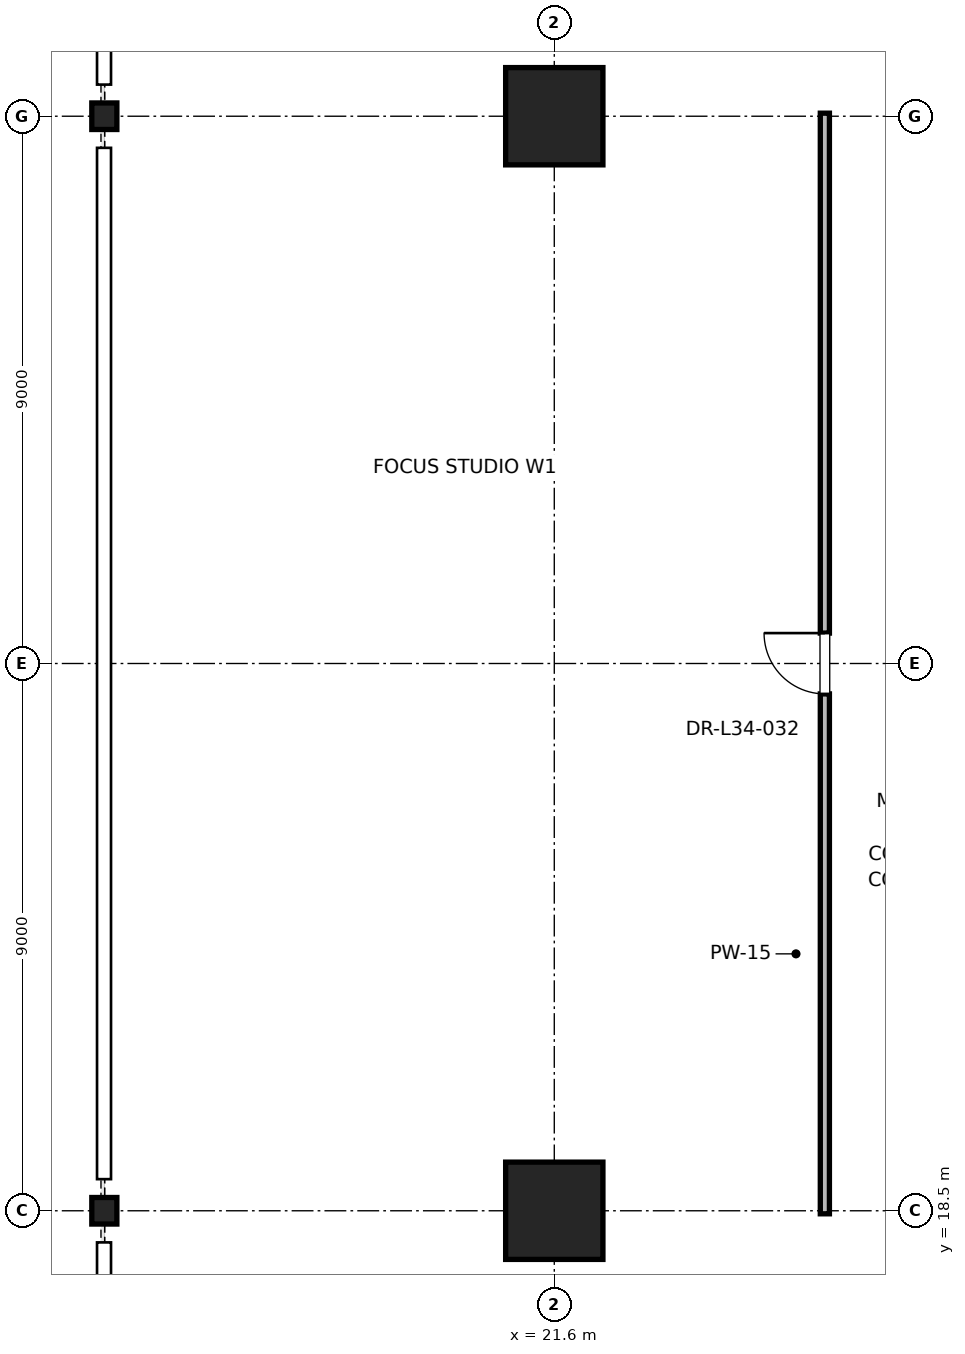
"""IFC4 building model, lengths in metres.
Left out: names, types, materials, properties, quantities, classifications, styles, units other than length and angle.
Written with IfcOpenShell. Run it as: python <this file> out.ifc"""

import sys

from ifc_helpers import new_model, si_unit, direction, frame, frame_2d, origin, origin_2d, place, context, subcontext, project, spatial, rectangle, i_section, extrude, element, fill, save


model = new_model("IFC4")
c1 = context("Model", 3, precision=1e-05, world=origin(), true_north=direction((0.0, 1.0)))
c2 = subcontext(c1, "Body", "Model", "MODEL_VIEW")
j1 = project(units=[si_unit("LENGTHUNIT", "METRE"), si_unit("PLANEANGLEUNIT", "RADIAN")], contexts=[c1])
p1 = place(None, origin())
s1 = spatial("IfcSite", under=j1, at=p1, CompositionType="ELEMENT")
p2 = place(p1, origin())
s2 = spatial("IfcBuilding", under=s1, at=p2, CompositionType="ELEMENT")
p3 = place(p2, frame((0.0, 0.0, 148.4)))
s3 = spatial("IfcBuildingStorey", under=s2, at=p3, CompositionType="ELEMENT", Elevation=148.4)
for number, where, z_axis, x_axis in (
    (1, (21.6, 18.5, 0.0), (0.0, 0.0, 1.0), (1.0, 0.0, 0.0)),
    (2, (21.6, 36.5, 0.0), (0.0, 0.0, 1.0), (1.0, 0.0, 0.0)),
):
    element("IfcColumn", number, at=place(p3, frame(where, z_axis=z_axis, x_axis=x_axis)), inside=s3, PredefinedType="COLUMN", context=c2, shape_type="SweptSolid", body=[
        extrude(rectangle(XDim=1.6, YDim=1.6, at=origin_2d()), origin(), (0.0, 0.0, 1.0), 4.0),
    ])
for number, where, z_axis, x_axis in (
    (3, (14.2, 18.5, 0.0), (0.0, 0.0, 1.0), (1.0, 0.0, 0.0)),
    (4, (14.2, 36.5, 0.0), (0.0, 0.0, 1.0), (1.0, 0.0, 0.0)),
):
    element("IfcColumn", number, at=place(p3, frame(where, z_axis=z_axis, x_axis=x_axis)), inside=s3, PredefinedType="COLUMN", context=c2, shape_type="SweptSolid", body=[
        extrude(i_section(OverallWidth=0.412, OverallDepth=0.437, WebThickness=0.036, FlangeThickness=0.058, FilletRadius=0.015, at=origin_2d()), origin(), (0.0, 0.0, 1.0), 4.0),
    ])
p4 = place(p3, frame((26.05, 18.45, 0.0), z_axis=(0.0, 0.0, 1.0), x_axis=(0.0, 1.0, 0.0)))
e5 = element("IfcWall", 5, at=p4, inside=s3, PredefinedType="PARTITIONING", context=c2, shape_type="SweptSolid", body=[
    extrude(rectangle(XDim=18.1, YDim=0.15, at=frame_2d((9.05, 0.0))), origin(), (0.0, 0.0, 1.0), 2.85),
])
p5 = place(p4, frame((8.55, 0.0, 0.0)))
e6 = element("IfcOpeningElement", 6, at=p5, cuts=e5, PredefinedType="OPENING", context=c2, shape_type="SweptSolid", body=[
    extrude(rectangle(XDim=1.0, YDim=2.15, at=frame_2d((0.5, 1.075))), frame((0.0, 0.075, 0.0), z_axis=(0.0, -1.0, 0.0), x_axis=(1.0, 0.0, 0.0)), (0.0, 0.0, 1.0), 0.15),
])
p6 = place(p5, origin())
e7 = element("IfcDoor", 7, at=p6, inside=s3, OperationType="SINGLE_SWING_RIGHT", PredefinedType="DOOR", context=c2, shape_type="SweptSolid", body=[
    extrude(rectangle(XDim=1.0, YDim=2.15, at=frame_2d((0.5, 1.075))), frame((0.0, 0.025, 0.0), z_axis=(0.0, -1.0, 0.0), x_axis=(1.0, 0.0, 0.0)), (0.0, 0.0, 1.0), 0.05),
])
fill(e6, e7)
save(model, sys.argv[1])
